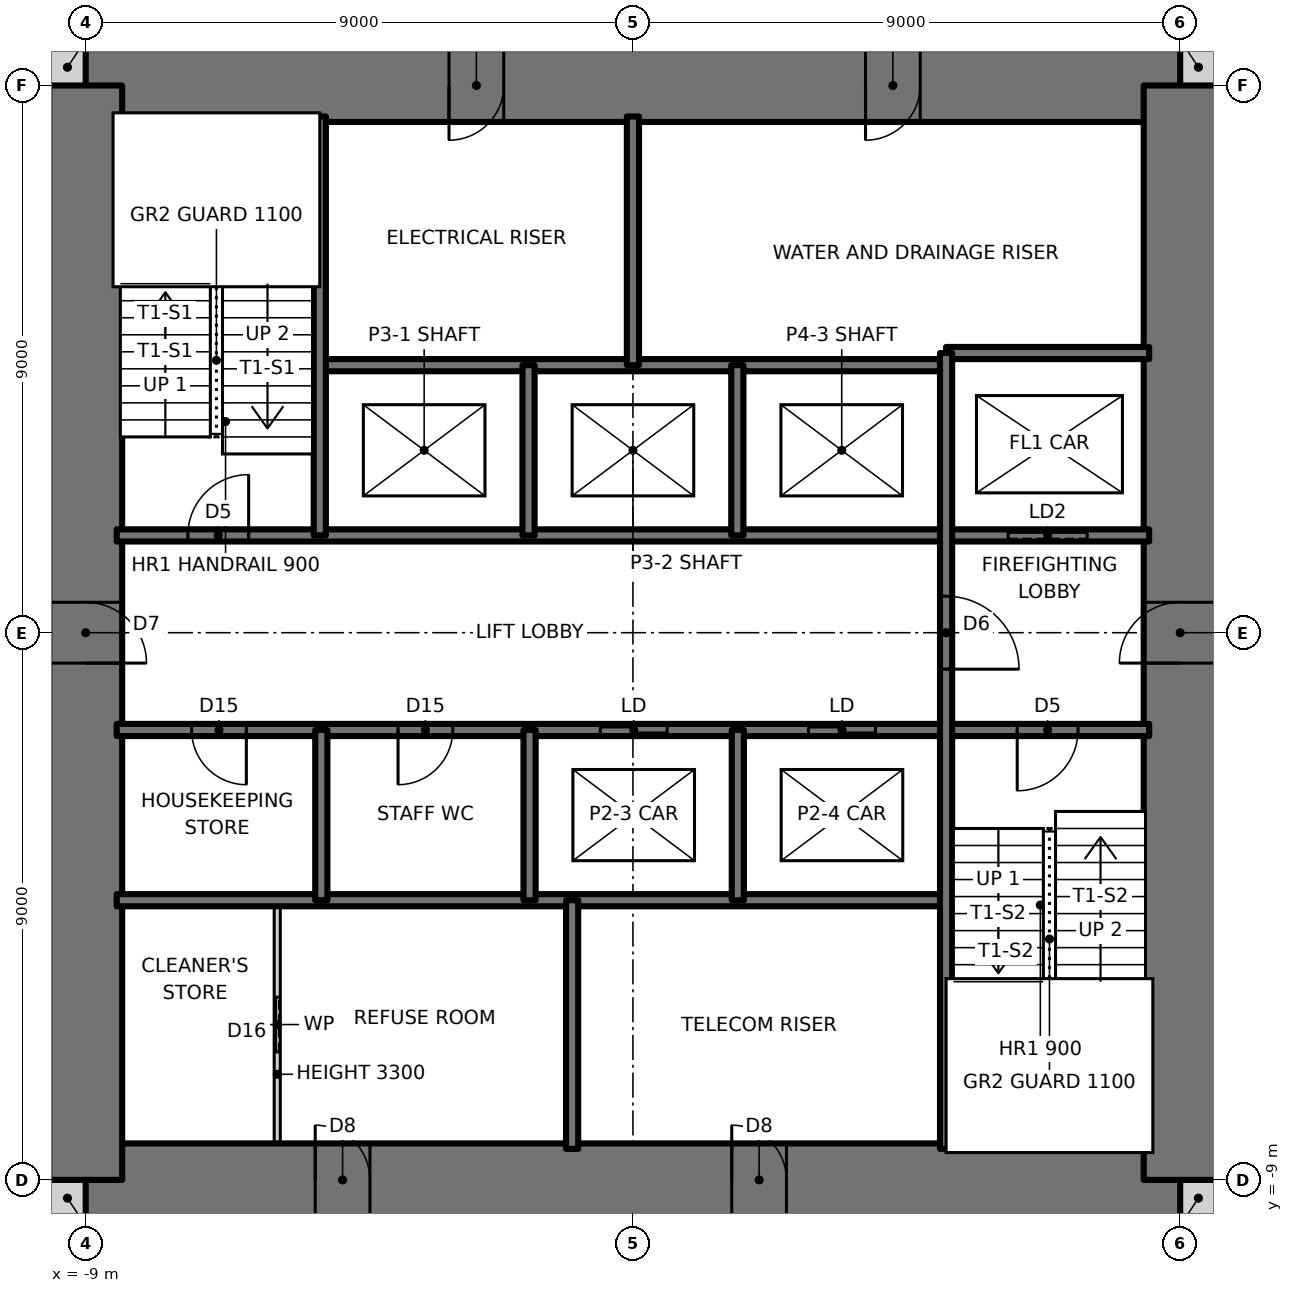
"""IFC4 building model, lengths in metres.
Left out: names, types, materials, properties, quantities, classifications, styles, units other than length and angle.
Written with IfcOpenShell. Run it as: python <this file> out.ifc"""

import sys

from ifc_helpers import new_model, si_unit, direction, frame, frame_2d, origin, place, context, subcontext, project, spatial, rectangle, extrude, element, fill, save


model = new_model("IFC4")
c1 = context("Model", 3, precision=1e-05, world=origin(), true_north=direction((0.0, 1.0)))
c2 = subcontext(c1, "Body", "Model", "MODEL_VIEW")
j1 = project(units=[si_unit("LENGTHUNIT", "METRE"), si_unit("PLANEANGLEUNIT", "RADIAN")], contexts=[c1])
p1 = place(None, origin())
s1 = spatial("IfcSite", under=j1, at=p1, CompositionType="ELEMENT")
p2 = place(p1, origin())
s2 = spatial("IfcBuilding", under=s1, at=p2, CompositionType="ELEMENT")
p3 = place(p2, frame((0.0, 0.0, 119.0)))
s3 = spatial("IfcBuildingStorey", under=s2, at=p3, CompositionType="ELEMENT", Elevation=119.0)
for number, where, z_axis, x_axis in (
    (1, (-9.6, -9.3, 0.0), (0.0, 0.0, 1.0), (1.0, 0.0, 0.0)),
    (2, (9.0, -9.3, 0.0), (0.0, 0.0, 1.0), (1.0, 0.0, 0.0)),
    (3, (9.0, 9.3, 0.0), (0.0, 0.0, 1.0), (1.0, 0.0, 0.0)),
    (4, (-9.6, 9.3, 0.0), (0.0, 0.0, 1.0), (1.0, 0.0, 0.0)),
):
    element("IfcWall", number, at=place(p3, frame(where, z_axis=z_axis, x_axis=x_axis)), inside=s3, PredefinedType="SOLIDWALL", context=c2, shape_type="SweptSolid", body=[
        extrude(rectangle(XDim=0.6, YDim=0.6, at=frame_2d((0.3, 0.0))), origin(), (0.0, 0.0, 1.0), 3.5),
    ])
p4 = place(p3, frame((-9.0, -9.0, 0.0), z_axis=(0.0, 0.0, 1.0), x_axis=(1.0, 0.0, 0.0)))
e5 = element("IfcWall", 5, at=p4, inside=s3, PredefinedType="SHEAR", context=c2, shape_type="SweptSolid", body=[
    extrude(rectangle(XDim=18.0, YDim=1.2, at=frame_2d((9.0, 0.0))), origin(), (0.0, 0.0, 1.0), 3.5),
])
p5 = place(p4, frame((3.775, 0.0, 0.0)))
e6 = element("IfcOpeningElement", 6, at=p5, cuts=e5, PredefinedType="OPENING", context=c2, shape_type="SweptSolid", body=[
    extrude(rectangle(XDim=0.9, YDim=2.1, at=frame_2d((0.45, 1.05))), frame((0.0, 0.61, 0.0), z_axis=(0.0, -1.0, 0.0), x_axis=(1.0, 0.0, 0.0)), (0.0, 0.0, 1.0), 1.22),
])
p6 = place(p4, frame((10.625, 0.0, 0.0)))
e7 = element("IfcOpeningElement", 7, at=p6, cuts=e5, PredefinedType="OPENING", context=c2, shape_type="SweptSolid", body=[
    extrude(rectangle(XDim=0.9, YDim=2.1, at=frame_2d((0.45, 1.05))), frame((0.0, 0.61, 0.0), z_axis=(0.0, -1.0, 0.0), x_axis=(1.0, 0.0, 0.0)), (0.0, 0.0, 1.0), 1.22),
])
p7 = place(p3, frame((9.0, 9.0, 0.0), z_axis=(0.0, 0.0, 1.0), x_axis=(-1.0, 0.0, 0.0)))
e8 = element("IfcWall", 8, at=p7, inside=s3, PredefinedType="SHEAR", context=c2, shape_type="SweptSolid", body=[
    extrude(rectangle(XDim=18.0, YDim=1.2, at=frame_2d((9.0, 0.0))), origin(), (0.0, 0.0, 1.0), 3.5),
])
p8 = place(p7, frame((11.125, 0.0, 0.0)))
e9 = element("IfcOpeningElement", 9, at=p8, cuts=e8, PredefinedType="OPENING", context=c2, shape_type="SweptSolid", body=[
    extrude(rectangle(XDim=0.9, YDim=2.1, at=frame_2d((0.45, 1.05))), frame((0.0, 0.61, 0.0), z_axis=(0.0, -1.0, 0.0), x_axis=(1.0, 0.0, 0.0)), (0.0, 0.0, 1.0), 1.22),
])
p9 = place(p7, frame((4.275, 0.0, 0.0)))
e10 = element("IfcOpeningElement", 10, at=p9, cuts=e8, PredefinedType="OPENING", context=c2, shape_type="SweptSolid", body=[
    extrude(rectangle(XDim=0.9, YDim=2.1, at=frame_2d((0.45, 1.05))), frame((0.0, 0.61, 0.0), z_axis=(0.0, -1.0, 0.0), x_axis=(1.0, 0.0, 0.0)), (0.0, 0.0, 1.0), 1.22),
])
p10 = place(p3, frame((9.0, -9.0, 0.0), z_axis=(0.0, 0.0, 1.0), x_axis=(0.0, 1.0, 0.0)))
e11 = element("IfcWall", 11, at=p10, inside=s3, PredefinedType="SHEAR", context=c2, shape_type="SweptSolid", body=[
    extrude(rectangle(XDim=18.0, YDim=1.2, at=frame_2d((9.0, 0.0))), origin(), (0.0, 0.0, 1.0), 3.5),
])
p11 = place(p10, frame((8.5, 0.0, 0.0)))
e12 = element("IfcOpeningElement", 12, at=p11, cuts=e11, PredefinedType="OPENING", context=c2, shape_type="SweptSolid", body=[
    extrude(rectangle(XDim=1.0, YDim=2.1, at=frame_2d((0.5, 1.05))), frame((0.0, 0.61, 0.0), z_axis=(0.0, -1.0, 0.0), x_axis=(1.0, 0.0, 0.0)), (0.0, 0.0, 1.0), 1.22),
])
p12 = place(p3, frame((-9.0, 9.0, 0.0), z_axis=(0.0, 0.0, 1.0), x_axis=(0.0, -1.0, 0.0)))
e13 = element("IfcWall", 13, at=p12, inside=s3, PredefinedType="SHEAR", context=c2, shape_type="SweptSolid", body=[
    extrude(rectangle(XDim=18.0, YDim=1.2, at=frame_2d((9.0, 0.0))), origin(), (0.0, 0.0, 1.0), 3.5),
])
p13 = place(p12, frame((8.5, 0.0, 0.0)))
e14 = element("IfcOpeningElement", 14, at=p13, cuts=e13, PredefinedType="OPENING", context=c2, shape_type="SweptSolid", body=[
    extrude(rectangle(XDim=1.0, YDim=2.1, at=frame_2d((0.5, 1.05))), frame((0.0, 0.61, 0.0), z_axis=(0.0, -1.0, 0.0), x_axis=(1.0, 0.0, 0.0)), (0.0, 0.0, 1.0), 1.22),
])
p14 = place(p3, frame((-8.49, -4.4, 0.0), z_axis=(0.0, 0.0, 1.0), x_axis=(1.0, 0.0, 0.0)))
e15 = element("IfcWall", 15, at=p14, inside=s3, PredefinedType="SOLIDWALL", context=c2, shape_type="SweptSolid", body=[
    extrude(rectangle(XDim=13.64, YDim=0.2, at=frame_2d((6.82, 0.0))), origin(), (0.0, 0.0, 1.0), 3.5),
])
p15 = place(p3, frame((-8.49, -1.6, 0.0), z_axis=(0.0, 0.0, 1.0), x_axis=(1.0, 0.0, 0.0)))
e16 = element("IfcWall", 16, at=p15, inside=s3, PredefinedType="SOLIDWALL", context=c2, shape_type="SweptSolid", body=[
    extrude(rectangle(XDim=16.98, YDim=0.2, at=frame_2d((8.49, 0.0))), origin(), (0.0, 0.0, 1.0), 3.5),
])
p16 = place(p15, frame((14.81, 0.0, 0.0)))
e17 = element("IfcOpeningElement", 17, at=p16, cuts=e16, PredefinedType="OPENING", context=c2, shape_type="SweptSolid", body=[
    extrude(rectangle(XDim=1.0, YDim=2.1, at=frame_2d((0.5, 1.05))), frame((0.0, 0.11, 0.0), z_axis=(0.0, -1.0, 0.0), x_axis=(1.0, 0.0, 0.0)), (0.0, 0.0, 1.0), 0.22),
])
p17 = place(p15, frame((1.232, 0.0, 0.0)))
e18 = element("IfcOpeningElement", 18, at=p17, cuts=e16, PredefinedType="OPENING", context=c2, shape_type="SweptSolid", body=[
    extrude(rectangle(XDim=0.9, YDim=2.1, at=frame_2d((0.45, 1.05))), frame((0.0, 0.11, 0.0), z_axis=(0.0, -1.0, 0.0), x_axis=(1.0, 0.0, 0.0)), (0.0, 0.0, 1.0), 0.22),
])
p18 = place(p15, frame((4.627, 0.0, 0.0)))
e19 = element("IfcOpeningElement", 19, at=p18, cuts=e16, PredefinedType="OPENING", context=c2, shape_type="SweptSolid", body=[
    extrude(rectangle(XDim=0.9, YDim=2.1, at=frame_2d((0.45, 1.05))), frame((0.0, 0.11, 0.0), z_axis=(0.0, -1.0, 0.0), x_axis=(1.0, 0.0, 0.0)), (0.0, 0.0, 1.0), 0.22),
])
p19 = place(p15, frame((7.953, 0.0, 0.0)))
e20 = element("IfcOpeningElement", 20, at=p19, cuts=e16, PredefinedType="OPENING", context=c2, shape_type="SweptSolid", body=[
    extrude(rectangle(XDim=1.1, YDim=2.1, at=frame_2d((0.55, 1.05))), frame((0.0, 0.11, 0.0), z_axis=(0.0, -1.0, 0.0), x_axis=(1.0, 0.0, 0.0)), (0.0, 0.0, 1.0), 0.22),
])
p20 = place(p15, frame((11.378, 0.0, 0.0)))
e21 = element("IfcOpeningElement", 21, at=p20, cuts=e16, PredefinedType="OPENING", context=c2, shape_type="SweptSolid", body=[
    extrude(rectangle(XDim=1.1, YDim=2.1, at=frame_2d((0.55, 1.05))), frame((0.0, 0.11, 0.0), z_axis=(0.0, -1.0, 0.0), x_axis=(1.0, 0.0, 0.0)), (0.0, 0.0, 1.0), 0.22),
])
p21 = place(p3, frame((-8.49, 1.6, 0.0), z_axis=(0.0, 0.0, 1.0), x_axis=(1.0, 0.0, 0.0)))
e22 = element("IfcWall", 22, at=p21, inside=s3, PredefinedType="SOLIDWALL", context=c2, shape_type="SweptSolid", body=[
    extrude(rectangle(XDim=16.98, YDim=0.2, at=frame_2d((8.49, 0.0))), origin(), (0.0, 0.0, 1.0), 3.5),
])
p22 = place(p21, frame((1.17, 0.0, 0.0)))
e23 = element("IfcOpeningElement", 23, at=p22, cuts=e22, PredefinedType="OPENING", context=c2, shape_type="SweptSolid", body=[
    extrude(rectangle(XDim=1.0, YDim=2.1, at=frame_2d((0.5, 1.05))), frame((0.0, 0.11, 0.0), z_axis=(0.0, -1.0, 0.0), x_axis=(1.0, 0.0, 0.0)), (0.0, 0.0, 1.0), 0.22),
])
p23 = place(p21, frame((14.66, 0.0, 0.0)))
e24 = element("IfcOpeningElement", 24, at=p23, cuts=e22, PredefinedType="OPENING", context=c2, shape_type="SweptSolid", body=[
    extrude(rectangle(XDim=1.3, YDim=2.1, at=frame_2d((0.65, 1.05))), frame((0.0, 0.11, 0.0), z_axis=(0.0, -1.0, 0.0), x_axis=(1.0, 0.0, 0.0)), (0.0, 0.0, 1.0), 0.22),
])
p24 = place(p3, frame((-5.15, 4.4, 0.0), z_axis=(0.0, 0.0, 1.0), x_axis=(1.0, 0.0, 0.0)))
e25 = element("IfcWall", 25, at=p24, inside=s3, PredefinedType="SOLIDWALL", context=c2, shape_type="SweptSolid", body=[
    extrude(rectangle(XDim=10.3, YDim=0.2, at=frame_2d((5.15, 0.0))), origin(), (0.0, 0.0, 1.0), 3.5),
])
p25 = place(p3, frame((5.15, 4.6, 0.0), z_axis=(0.0, 0.0, 1.0), x_axis=(1.0, 0.0, 0.0)))
e26 = element("IfcWall", 26, at=p25, inside=s3, PredefinedType="SOLIDWALL", context=c2, shape_type="SweptSolid", body=[
    extrude(rectangle(XDim=3.34, YDim=0.2, at=frame_2d((1.67, 0.0))), origin(), (0.0, 0.0, 1.0), 3.5),
])
p26 = place(p3, frame((5.15, -8.49, 0.0), z_axis=(0.0, 0.0, 1.0), x_axis=(0.0, 1.0, 0.0)))
e27 = element("IfcWall", 27, at=p26, inside=s3, PredefinedType="SOLIDWALL", context=c2, shape_type="SweptSolid", body=[
    extrude(rectangle(XDim=13.09, YDim=0.2, at=frame_2d((6.545, 0.0))), origin(), (0.0, 0.0, 1.0), 3.5),
])
p27 = place(p26, frame((7.89, 0.0, 0.0)))
e28 = element("IfcOpeningElement", 28, at=p27, cuts=e27, PredefinedType="OPENING", context=c2, shape_type="SweptSolid", body=[
    extrude(rectangle(XDim=1.2, YDim=2.1, at=frame_2d((0.6, 1.05))), frame((0.0, 0.11, 0.0), z_axis=(0.0, -1.0, 0.0), x_axis=(1.0, 0.0, 0.0)), (0.0, 0.0, 1.0), 0.22),
])
for number, where, z_axis, x_axis in (
    (29, (1.725, -4.4, 0.0), (0.0, 0.0, 1.0), (0.0, 1.0, 0.0)),
    (30, (1.717, 1.6, 0.0), (0.0, 0.0, 1.0), (0.0, 1.0, 0.0)),
):
    element("IfcWall", number, at=place(p3, frame(where, z_axis=z_axis, x_axis=x_axis)), inside=s3, PredefinedType="SOLIDWALL", context=c2, shape_type="SweptSolid", body=[
        extrude(rectangle(XDim=2.8, YDim=0.2, at=frame_2d((1.4, 0.0))), origin(), (0.0, 0.0, 1.0), 3.5),
    ])
for number, where, z_axis, x_axis in (
    (31, (0.0, 4.4, 0.0), (0.0, 0.0, 1.0), (0.0, 1.0, 0.0)),
    (32, (-1.0, -8.49, 0.0), (0.0, 0.0, 1.0), (0.0, 1.0, 0.0)),
):
    element("IfcWall", number, at=place(p3, frame(where, z_axis=z_axis, x_axis=x_axis)), inside=s3, PredefinedType="SOLIDWALL", context=c2, shape_type="SweptSolid", body=[
        extrude(rectangle(XDim=4.09, YDim=0.2, at=frame_2d((2.045, 0.0))), origin(), (0.0, 0.0, 1.0), 3.5),
    ])
for number, where, z_axis, x_axis in (
    (33, (-1.7, -4.4, 0.0), (0.0, 0.0, 1.0), (0.0, 1.0, 0.0)),
    (34, (-1.717, 1.6, 0.0), (0.0, 0.0, 1.0), (0.0, 1.0, 0.0)),
    (35, (-5.125, -4.4, 0.0), (0.0, 0.0, 1.0), (0.0, 1.0, 0.0)),
):
    element("IfcWall", number, at=place(p3, frame(where, z_axis=z_axis, x_axis=x_axis)), inside=s3, PredefinedType="SOLIDWALL", context=c2, shape_type="SweptSolid", body=[
        extrude(rectangle(XDim=2.8, YDim=0.2, at=frame_2d((1.4, 0.0))), origin(), (0.0, 0.0, 1.0), 3.5),
    ])
p28 = place(p3, frame((-5.15, 1.6, 0.0), z_axis=(0.0, 0.0, 1.0), x_axis=(0.0, 1.0, 0.0)))
e36 = element("IfcWall", 36, at=p28, inside=s3, PredefinedType="SOLIDWALL", context=c2, shape_type="SweptSolid", body=[
    extrude(rectangle(XDim=6.89, YDim=0.2, at=frame_2d((3.445, 0.0))), origin(), (0.0, 0.0, 1.0), 3.5),
])
p29 = place(p3, frame((-5.85, -8.49, 0.0), z_axis=(0.0, 0.0, 1.0), x_axis=(0.0, 1.0, 0.0)))
e37 = element("IfcWall", 37, at=p29, inside=s3, PredefinedType="PARTITIONING", context=c2, shape_type="SweptSolid", body=[
    extrude(rectangle(XDim=4.09, YDim=0.1, at=frame_2d((2.045, 0.0))), origin(), (0.0, 0.0, 1.0), 3.3),
])
p30 = place(p29, frame((1.595, 0.0, 0.0)))
e38 = element("IfcOpeningElement", 38, at=p30, cuts=e37, PredefinedType="OPENING", context=c2, shape_type="SweptSolid", body=[
    extrude(rectangle(XDim=0.9, YDim=2.1, at=frame_2d((0.45, 1.05))), frame((0.0, 0.06, 0.0), z_axis=(0.0, -1.0, 0.0), x_axis=(1.0, 0.0, 0.0)), (0.0, 0.0, 1.0), 0.12),
])
p31 = place(p22, origin())
e39 = element("IfcDoor", 39, at=p31, inside=s3, OperationType="SINGLE_SWING_RIGHT", PredefinedType="DOOR", context=c2, shape_type="SweptSolid", body=[
    extrude(rectangle(XDim=1.0, YDim=2.1, at=frame_2d((0.5, 1.05))), frame((0.0, 0.025, 0.0), z_axis=(0.0, -1.0, 0.0), x_axis=(1.0, 0.0, 0.0)), (0.0, 0.0, 1.0), 0.05),
])
fill(e23, e39)
p32 = place(p16, frame((1.0, 0.0, 0.0), z_axis=(0.0, 0.0, 1.0), x_axis=(-1.0, 0.0, 0.0)))
e40 = element("IfcDoor", 40, at=p32, inside=s3, OperationType="SINGLE_SWING_RIGHT", PredefinedType="DOOR", context=c2, shape_type="SweptSolid", body=[
    extrude(rectangle(XDim=1.0, YDim=2.1, at=frame_2d((0.5, 1.05))), frame((0.0, 0.025, 0.0), z_axis=(0.0, -1.0, 0.0), x_axis=(1.0, 0.0, 0.0)), (0.0, 0.0, 1.0), 0.05),
])
fill(e17, e40)
p33 = place(p27, frame((1.2, 0.0, 0.0), z_axis=(0.0, 0.0, 1.0), x_axis=(-1.0, 0.0, 0.0)))
e41 = element("IfcDoor", 41, at=p33, inside=s3, OperationType="SINGLE_SWING_RIGHT", PredefinedType="DOOR", context=c2, shape_type="SweptSolid", body=[
    extrude(rectangle(XDim=1.2, YDim=2.1, at=frame_2d((0.6, 1.05))), frame((0.0, 0.025, 0.0), z_axis=(0.0, -1.0, 0.0), x_axis=(1.0, 0.0, 0.0)), (0.0, 0.0, 1.0), 0.05),
])
fill(e28, e41)
p34 = place(p17, frame((0.9, 0.0, 0.0), z_axis=(0.0, 0.0, 1.0), x_axis=(-1.0, 0.0, 0.0)))
e42 = element("IfcDoor", 42, at=p34, inside=s3, OperationType="SINGLE_SWING_LEFT", PredefinedType="DOOR", context=c2, shape_type="SweptSolid", body=[
    extrude(rectangle(XDim=0.9, YDim=2.1, at=frame_2d((0.45, 1.05))), frame((0.0, 0.025, 0.0), z_axis=(0.0, -1.0, 0.0), x_axis=(1.0, 0.0, 0.0)), (0.0, 0.0, 1.0), 0.05),
])
fill(e18, e42)
p35 = place(p18, frame((0.9, 0.0, 0.0), z_axis=(0.0, 0.0, 1.0), x_axis=(-1.0, 0.0, 0.0)))
e43 = element("IfcDoor", 43, at=p35, inside=s3, OperationType="SINGLE_SWING_RIGHT", PredefinedType="DOOR", context=c2, shape_type="SweptSolid", body=[
    extrude(rectangle(XDim=0.9, YDim=2.1, at=frame_2d((0.45, 1.05))), frame((0.0, 0.025, 0.0), z_axis=(0.0, -1.0, 0.0), x_axis=(1.0, 0.0, 0.0)), (0.0, 0.0, 1.0), 0.05),
])
fill(e19, e43)
p36 = place(p30, origin())
e44 = element("IfcDoor", 44, at=p36, inside=s3, OperationType="SLIDING_TO_LEFT", PredefinedType="DOOR", context=c2, shape_type="SweptSolid", body=[
    extrude(rectangle(XDim=0.9, YDim=2.1, at=frame_2d((0.45, 1.05))), frame((0.0, 0.025, 0.0), z_axis=(0.0, -1.0, 0.0), x_axis=(1.0, 0.0, 0.0)), (0.0, 0.0, 1.0), 0.05),
])
fill(e38, e44)
p37 = place(p13, origin())
e45 = element("IfcDoor", 45, at=p37, inside=s3, OperationType="SINGLE_SWING_RIGHT", PredefinedType="DOOR", context=c2, shape_type="SweptSolid", body=[
    extrude(rectangle(XDim=1.0, YDim=2.1, at=frame_2d((0.5, 1.05))), frame((0.0, 0.025, 0.0), z_axis=(0.0, -1.0, 0.0), x_axis=(1.0, 0.0, 0.0)), (0.0, 0.0, 1.0), 0.05),
])
fill(e14, e45)
p38 = place(p11, origin())
e46 = element("IfcDoor", 46, at=p38, inside=s3, OperationType="SINGLE_SWING_LEFT", PredefinedType="DOOR", context=c2, shape_type="SweptSolid", body=[
    extrude(rectangle(XDim=1.0, YDim=2.1, at=frame_2d((0.5, 1.05))), frame((0.0, 0.025, 0.0), z_axis=(0.0, -1.0, 0.0), x_axis=(1.0, 0.0, 0.0)), (0.0, 0.0, 1.0), 0.05),
])
fill(e12, e46)
p39 = place(p8, origin())
e47 = element("IfcDoor", 47, at=p39, inside=s3, OperationType="SINGLE_SWING_RIGHT", PredefinedType="DOOR", context=c2, shape_type="SweptSolid", body=[
    extrude(rectangle(XDim=0.9, YDim=2.1, at=frame_2d((0.45, 1.05))), frame((0.0, 0.025, 0.0), z_axis=(0.0, -1.0, 0.0), x_axis=(1.0, 0.0, 0.0)), (0.0, 0.0, 1.0), 0.05),
])
fill(e9, e47)
p40 = place(p9, origin())
e48 = element("IfcDoor", 48, at=p40, inside=s3, OperationType="SINGLE_SWING_RIGHT", PredefinedType="DOOR", context=c2, shape_type="SweptSolid", body=[
    extrude(rectangle(XDim=0.9, YDim=2.1, at=frame_2d((0.45, 1.05))), frame((0.0, 0.025, 0.0), z_axis=(0.0, -1.0, 0.0), x_axis=(1.0, 0.0, 0.0)), (0.0, 0.0, 1.0), 0.05),
])
fill(e10, e48)
p41 = place(p5, origin())
e49 = element("IfcDoor", 49, at=p41, inside=s3, OperationType="SINGLE_SWING_LEFT", PredefinedType="DOOR", context=c2, shape_type="SweptSolid", body=[
    extrude(rectangle(XDim=0.9, YDim=2.1, at=frame_2d((0.45, 1.05))), frame((0.0, 0.025, 0.0), z_axis=(0.0, -1.0, 0.0), x_axis=(1.0, 0.0, 0.0)), (0.0, 0.0, 1.0), 0.05),
])
fill(e6, e49)
p42 = place(p6, origin())
e50 = element("IfcDoor", 50, at=p42, inside=s3, OperationType="SINGLE_SWING_LEFT", PredefinedType="DOOR", context=c2, shape_type="SweptSolid", body=[
    extrude(rectangle(XDim=0.9, YDim=2.1, at=frame_2d((0.45, 1.05))), frame((0.0, 0.025, 0.0), z_axis=(0.0, -1.0, 0.0), x_axis=(1.0, 0.0, 0.0)), (0.0, 0.0, 1.0), 0.05),
])
fill(e7, e50)
p43 = place(p19, origin())
e51 = element("IfcDoor", 51, at=p43, inside=s3, OperationType="DOUBLE_DOOR_SLIDING", PredefinedType="DOOR", context=c2, shape_type="SweptSolid", body=[
    extrude(rectangle(XDim=1.1, YDim=2.1, at=frame_2d((0.55, 1.05))), frame((0.0, 0.025, 0.0), z_axis=(0.0, -1.0, 0.0), x_axis=(1.0, 0.0, 0.0)), (0.0, 0.0, 1.0), 0.05),
])
fill(e20, e51)
p44 = place(p20, origin())
e52 = element("IfcDoor", 52, at=p44, inside=s3, OperationType="DOUBLE_DOOR_SLIDING", PredefinedType="DOOR", context=c2, shape_type="SweptSolid", body=[
    extrude(rectangle(XDim=1.1, YDim=2.1, at=frame_2d((0.55, 1.05))), frame((0.0, 0.025, 0.0), z_axis=(0.0, -1.0, 0.0), x_axis=(1.0, 0.0, 0.0)), (0.0, 0.0, 1.0), 0.05),
])
fill(e21, e52)
p45 = place(p23, origin())
e53 = element("IfcDoor", 53, at=p45, inside=s3, OperationType="SLIDING_TO_LEFT", PredefinedType="DOOR", context=c2, shape_type="SweptSolid", body=[
    extrude(rectangle(XDim=1.3, YDim=2.1, at=frame_2d((0.65, 1.05))), frame((0.0, 0.025, 0.0), z_axis=(0.0, -1.0, 0.0), x_axis=(1.0, 0.0, 0.0)), (0.0, 0.0, 1.0), 0.05),
])
fill(e24, e53)
save(model, sys.argv[1])
